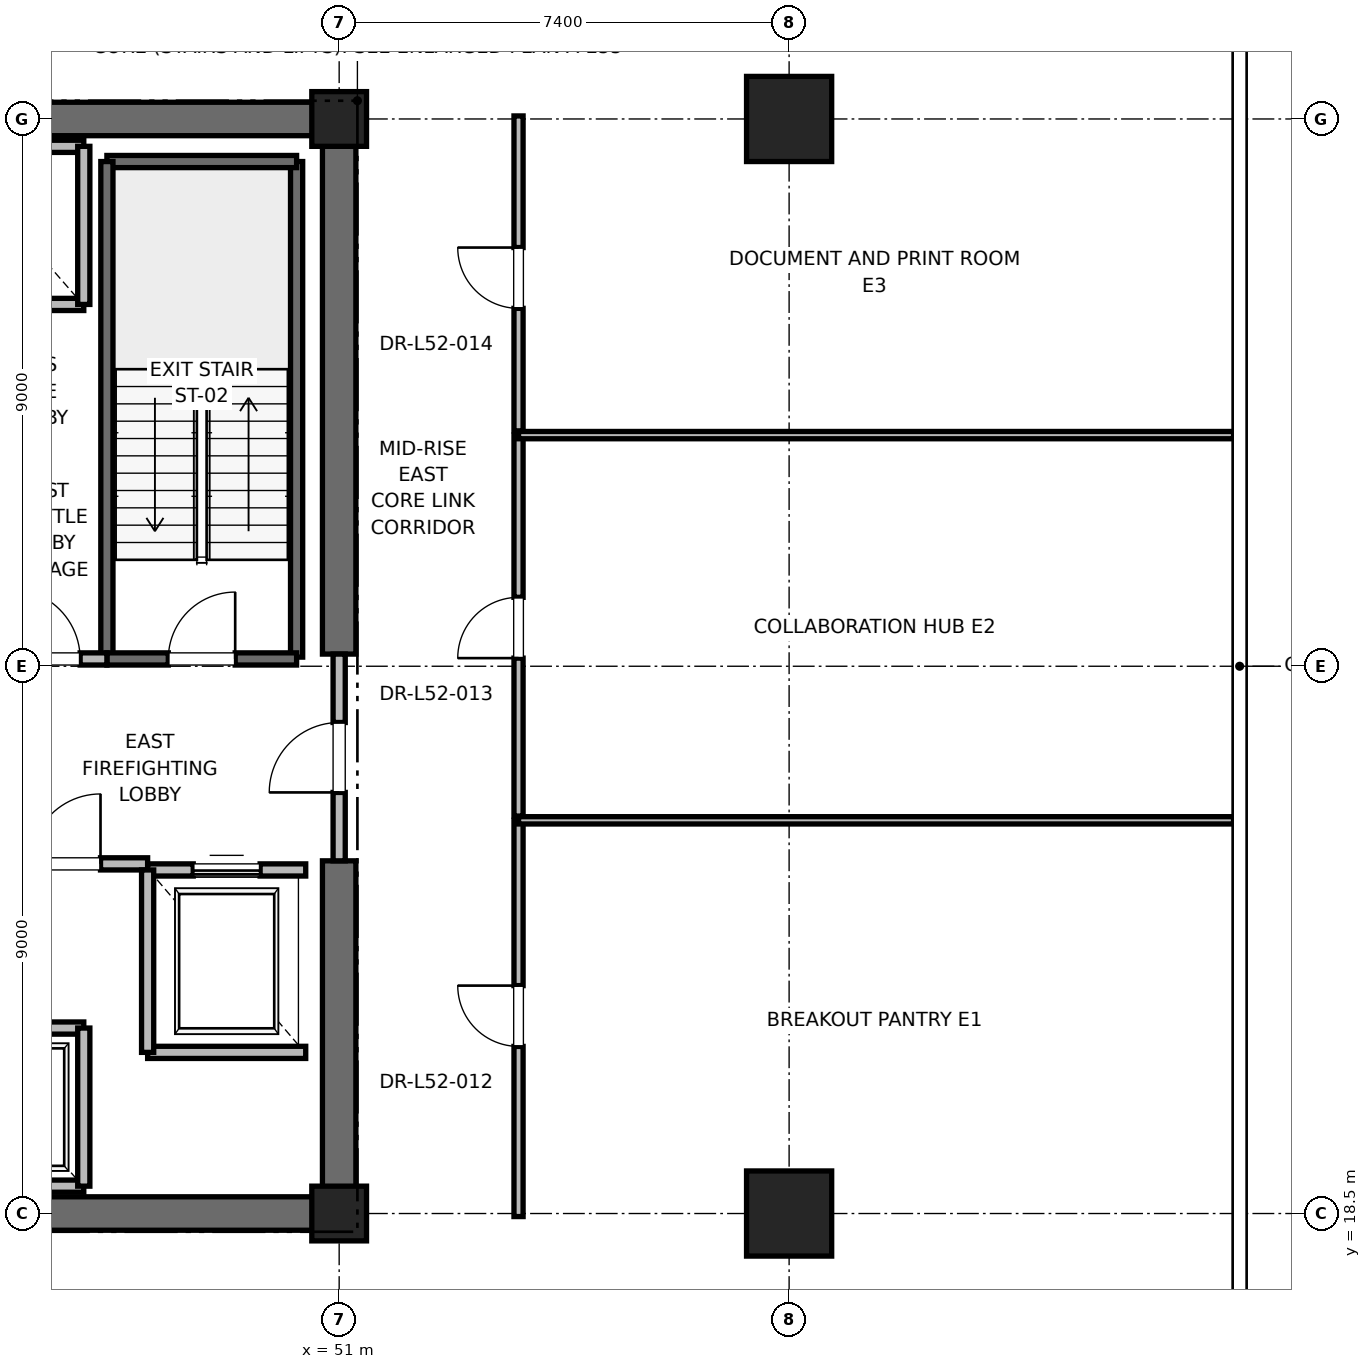
"""IFC4 building model, lengths in metres.
Left out: names, types, materials, properties, quantities, classifications, styles, units other than length and angle.
Written with IfcOpenShell. Run it as: python <this file> out.ifc"""

import sys

from ifc_helpers import new_model, si_unit, direction, frame, frame_2d, origin, origin_2d, place, context, subcontext, project, spatial, rectangle, extrude, element, fill, save


model = new_model("IFC4")
c1 = context("Model", 3, precision=1e-05, world=origin(), true_north=direction((0.0, 1.0)))
c2 = subcontext(c1, "Body", "Model", "MODEL_VIEW")
j1 = project(units=[si_unit("LENGTHUNIT", "METRE"), si_unit("PLANEANGLEUNIT", "RADIAN")], contexts=[c1])
p1 = place(None, origin())
s1 = spatial("IfcSite", under=j1, at=p1, CompositionType="ELEMENT")
p2 = place(p1, origin())
s2 = spatial("IfcBuilding", under=s1, at=p2, CompositionType="ELEMENT")
p3 = place(p2, frame((0.0, 0.0, 225.2)))
s3 = spatial("IfcBuildingStorey", under=s2, at=p3, CompositionType="ELEMENT", Elevation=225.2)
for number, where, z_axis, x_axis in (
    (1, (58.4, 18.5, 0.0), (0.0, 0.0, 1.0), (1.0, 0.0, 0.0)),
    (2, (58.4, 36.5, 0.0), (0.0, 0.0, 1.0), (1.0, 0.0, 0.0)),
):
    element("IfcColumn", number, at=place(p3, frame(where, z_axis=z_axis, x_axis=x_axis)), inside=s3, PredefinedType="COLUMN", context=c2, shape_type="SweptSolid", body=[
        extrude(rectangle(XDim=1.4, YDim=1.4, at=origin_2d()), origin(), (0.0, 0.0, 1.0), 4.0),
    ])
for number, where, z_axis, x_axis in (
    (3, (51.0, 18.5, 0.0), (0.0, 0.0, 1.0), (1.0, 0.0, 0.0)),
    (4, (51.0, 36.5, 0.0), (0.0, 0.0, 1.0), (1.0, 0.0, 0.0)),
):
    element("IfcColumn", number, at=place(p3, frame(where, z_axis=z_axis, x_axis=x_axis)), inside=s3, PredefinedType="PILASTER", context=c2, shape_type="SweptSolid", body=[
        extrude(rectangle(XDim=0.9, YDim=0.9, at=origin_2d()), origin(), (0.0, 0.0, 1.0), 4.0),
    ])
p4 = place(p3, frame((41.8, 18.5, 0.0), z_axis=(0.0, 0.0, 1.0), x_axis=(1.0, 0.0, 0.0)))
e5 = element("IfcWall", 5, at=p4, inside=s3, PredefinedType="SHEAR", context=c2, shape_type="SweptSolid", body=[
    extrude(rectangle(XDim=9.2, YDim=0.55, at=frame_2d((4.6, 0.0))), origin(), (0.0, 0.0, 1.0), 3.775),
])
for number, where, z_axis, x_axis in (
    (6, (45.2, 36.5, 0.0), (0.0, 0.0, 1.0), (1.0, 0.0, 0.0)),
    (7, (51.0, 18.5, 0.0), (0.0, 0.0, 1.0), (0.0, 1.0, 0.0)),
):
    element("IfcWall", number, at=place(p3, frame(where, z_axis=z_axis, x_axis=x_axis)), inside=s3, PredefinedType="SHEAR", context=c2, shape_type="SweptSolid", body=[
        extrude(rectangle(XDim=5.8, YDim=0.55, at=frame_2d((2.9, 0.0))), origin(), (0.0, 0.0, 1.0), 3.775),
    ])
p5 = place(p3, frame((51.0, 27.7, 0.0), z_axis=(0.0, 0.0, 1.0), x_axis=(0.0, 1.0, 0.0)))
e8 = element("IfcWall", 8, at=p5, inside=s3, PredefinedType="SHEAR", context=c2, shape_type="SweptSolid", body=[
    extrude(rectangle(XDim=8.8, YDim=0.55, at=frame_2d((4.4, 0.0))), origin(), (0.0, 0.0, 1.0), 3.775),
])
p6 = place(p3, frame((50.3, 27.65, 0.0), z_axis=(0.0, 0.0, 1.0), x_axis=(0.0, 1.0, 0.0)))
e9 = element("IfcWall", 9, at=p6, inside=s3, PredefinedType="SOLIDWALL", context=c2, shape_type="SweptSolid", body=[
    extrude(rectangle(XDim=8.15, YDim=0.2, at=frame_2d((4.075, 0.0))), origin(), (0.0, 0.0, 1.0), 3.775),
])
p7 = place(p3, frame((47.18, 35.8, 0.0), z_axis=(0.0, 0.0, 1.0), x_axis=(1.0, 0.0, 0.0)))
e10 = element("IfcWall", 10, at=p7, inside=s3, PredefinedType="SOLIDWALL", context=c2, shape_type="SweptSolid", body=[
    extrude(rectangle(XDim=3.12, YDim=0.2, at=frame_2d((1.56, 0.0))), origin(), (0.0, 0.0, 1.0), 3.775),
])
p8 = place(p3, frame((47.18, 27.62, 0.0), z_axis=(0.0, 0.0, 1.0), x_axis=(0.0, 1.0, 0.0)))
e11 = element("IfcWall", 11, at=p8, inside=s3, PredefinedType="SOLIDWALL", context=c2, shape_type="SweptSolid", body=[
    extrude(rectangle(XDim=8.18, YDim=0.2, at=frame_2d((4.09, 0.0))), origin(), (0.0, 0.0, 1.0), 3.775),
])
p9 = place(p3, frame((47.18, 27.62, 0.0), z_axis=(0.0, 0.0, 1.0), x_axis=(1.0, 0.0, 0.0)))
e12 = element("IfcWall", 12, at=p9, inside=s3, PredefinedType="SOLIDWALL", context=c2, shape_type="SweptSolid", body=[
    extrude(rectangle(XDim=3.12, YDim=0.2, at=frame_2d((1.56, 0.0))), origin(), (0.0, 0.0, 1.0), 3.775),
])
p10 = place(p9, frame((1.01, 0.0, 0.0)))
e13 = element("IfcOpeningElement", 13, at=p10, cuts=e12, PredefinedType="OPENING", context=c2, shape_type="SweptSolid", body=[
    extrude(rectangle(XDim=1.1, YDim=2.15, at=frame_2d((0.55, 1.075))), frame((0.0, 0.1, 0.0), z_axis=(0.0, -1.0, 0.0), x_axis=(1.0, 0.0, 0.0)), (0.0, 0.0, 1.0), 0.2),
])
p11 = place(p3, frame((45.15, 24.25, 0.0), z_axis=(0.0, 0.0, 1.0), x_axis=(1.0, 0.0, 0.0)))
e14 = element("IfcWall", 14, at=p11, inside=s3, PredefinedType="PARTITIONING", context=c2, shape_type="SweptSolid", body=[
    extrude(rectangle(XDim=2.7, YDim=0.2, at=frame_2d((1.35, 0.0))), origin(), (0.0, 0.0, 1.0), 3.775),
])
p12 = place(p11, frame((0.775, 0.0, 0.0)))
e15 = element("IfcOpeningElement", 15, at=p12, cuts=e14, PredefinedType="OPENING", context=c2, shape_type="SweptSolid", body=[
    extrude(rectangle(XDim=1.15, YDim=2.2, at=frame_2d((0.575, 1.1))), frame((0.0, 0.1, 0.0), z_axis=(0.0, -1.0, 0.0), x_axis=(1.0, 0.0, 0.0)), (0.0, 0.0, 1.0), 0.2),
])
p13 = place(p3, frame((45.15, 27.62, 0.0), z_axis=(0.0, 0.0, 1.0), x_axis=(1.0, 0.0, 0.0)))
e16 = element("IfcWall", 16, at=p13, inside=s3, PredefinedType="PARTITIONING", context=c2, shape_type="SweptSolid", body=[
    extrude(rectangle(XDim=2.03, YDim=0.2, at=frame_2d((1.015, 0.0))), origin(), (0.0, 0.0, 1.0), 3.775),
])
p14 = place(p13, frame((0.44, 0.0, 0.0)))
e17 = element("IfcOpeningElement", 17, at=p14, cuts=e16, PredefinedType="OPENING", context=c2, shape_type="SweptSolid", body=[
    extrude(rectangle(XDim=1.15, YDim=2.2, at=frame_2d((0.575, 1.1))), frame((0.0, 0.1, 0.0), z_axis=(0.0, -1.0, 0.0), x_axis=(1.0, 0.0, 0.0)), (0.0, 0.0, 1.0), 0.2),
])
p15 = place(p3, frame((51.0, 24.3, 0.0), z_axis=(0.0, 0.0, 1.0), x_axis=(0.0, 1.0, 0.0)))
e18 = element("IfcWall", 18, at=p15, inside=s3, PredefinedType="PARTITIONING", context=c2, shape_type="SweptSolid", body=[
    extrude(rectangle(XDim=3.4, YDim=0.2, at=frame_2d((1.7, 0.0))), origin(), (0.0, 0.0, 1.0), 2.755),
])
p16 = place(p15, frame((1.125, 0.0, 0.0)))
e19 = element("IfcOpeningElement", 19, at=p16, cuts=e18, PredefinedType="OPENING", context=c2, shape_type="SweptSolid", body=[
    extrude(rectangle(XDim=1.15, YDim=2.2, at=frame_2d((0.575, 1.1))), frame((0.0, 0.1, 0.0), z_axis=(0.0, -1.0, 0.0), x_axis=(1.0, 0.0, 0.0)), (0.0, 0.0, 1.0), 0.2),
])
p17 = place(p3, frame((47.85, 21.15, 0.0), z_axis=(0.0, 0.0, 1.0), x_axis=(1.0, 0.0, 0.0)))
e20 = element("IfcWall", 20, at=p17, inside=s3, PredefinedType="SOLIDWALL", context=c2, shape_type="SweptSolid", body=[
    extrude(rectangle(XDim=2.6, YDim=0.2, at=frame_2d((1.3, 0.0))), origin(), (0.0, 0.0, 1.0), 3.775),
])
p18 = place(p3, frame((50.45, 24.15, 0.0), z_axis=(0.0, 0.0, 1.0), x_axis=(-1.0, 0.0, 0.0)))
e21 = element("IfcWall", 21, at=p18, inside=s3, PredefinedType="SOLIDWALL", context=c2, shape_type="SweptSolid", body=[
    extrude(rectangle(XDim=2.6, YDim=0.2, at=frame_2d((1.3, 0.0))), origin(), (0.0, 0.0, 1.0), 2.755),
])
p19 = place(p18, frame((0.75, 0.0, 0.0)))
e22 = element("IfcOpeningElement", 22, at=p19, cuts=e21, PredefinedType="OPENING", context=c2, shape_type="SweptSolid", body=[
    extrude(rectangle(XDim=1.1, YDim=2.2, at=frame_2d((0.55, 1.1))), frame((0.0, 0.1, 0.0), z_axis=(0.0, -1.0, 0.0), x_axis=(1.0, 0.0, 0.0)), (0.0, 0.0, 1.0), 0.2),
])
p20 = place(p3, frame((47.85, 24.15, 0.0), z_axis=(0.0, 0.0, 1.0), x_axis=(0.0, -1.0, 0.0)))
e23 = element("IfcWall", 23, at=p20, inside=s3, PredefinedType="SOLIDWALL", context=c2, shape_type="SweptSolid", body=[
    extrude(rectangle(XDim=3.0, YDim=0.2, at=frame_2d((1.5, 0.0))), origin(), (0.0, 0.0, 1.0), 3.775),
])
p21 = place(p3, frame((44.5, 18.95, 0.0), z_axis=(0.0, 0.0, 1.0), x_axis=(1.0, 0.0, 0.0)))
e24 = element("IfcWall", 24, at=p21, inside=s3, PredefinedType="SOLIDWALL", context=c2, shape_type="SweptSolid", body=[
    extrude(rectangle(XDim=2.3, YDim=0.2, at=frame_2d((1.15, 0.0))), origin(), (0.0, 0.0, 1.0), 3.775),
])
p22 = place(p3, frame((46.8, 21.55, 0.0), z_axis=(0.0, 0.0, 1.0), x_axis=(-1.0, 0.0, 0.0)))
e25 = element("IfcWall", 25, at=p22, inside=s3, PredefinedType="SOLIDWALL", context=c2, shape_type="SweptSolid", body=[
    extrude(rectangle(XDim=2.3, YDim=0.2, at=frame_2d((1.15, 0.0))), origin(), (0.0, 0.0, 1.0), 3.775),
])
p23 = place(p22, frame((0.6, 0.0, 0.0)))
e26 = element("IfcOpeningElement", 26, at=p23, cuts=e25, PredefinedType="OPENING", context=c2, shape_type="SweptSolid", body=[
    extrude(rectangle(XDim=1.1, YDim=2.2, at=frame_2d((0.55, 1.1))), frame((0.0, 0.1, 0.0), z_axis=(0.0, -1.0, 0.0), x_axis=(1.0, 0.0, 0.0)), (0.0, 0.0, 1.0), 0.2),
])
p24 = place(p3, frame((46.8, 18.95, 0.0), z_axis=(0.0, 0.0, 1.0), x_axis=(0.0, 1.0, 0.0)))
e27 = element("IfcWall", 27, at=p24, inside=s3, PredefinedType="SOLIDWALL", context=c2, shape_type="SweptSolid", body=[
    extrude(rectangle(XDim=2.6, YDim=0.2, at=frame_2d((1.3, 0.0))), origin(), (0.0, 0.0, 1.0), 3.775),
])
p25 = place(p3, frame((44.5, 33.45, 0.0), z_axis=(0.0, 0.0, 1.0), x_axis=(1.0, 0.0, 0.0)))
e28 = element("IfcWall", 28, at=p25, inside=s3, PredefinedType="SOLIDWALL", context=c2, shape_type="SweptSolid", body=[
    extrude(rectangle(XDim=2.3, YDim=0.2, at=frame_2d((1.15, 0.0))), origin(), (0.0, 0.0, 1.0), 3.775),
])
p26 = place(p3, frame((46.8, 36.05, 0.0), z_axis=(0.0, 0.0, 1.0), x_axis=(-1.0, 0.0, 0.0)))
e29 = element("IfcWall", 29, at=p26, inside=s3, PredefinedType="SOLIDWALL", context=c2, shape_type="SweptSolid", body=[
    extrude(rectangle(XDim=2.3, YDim=0.2, at=frame_2d((1.15, 0.0))), origin(), (0.0, 0.0, 1.0), 2.755),
])
p27 = place(p3, frame((46.8, 33.45, 0.0), z_axis=(0.0, 0.0, 1.0), x_axis=(0.0, 1.0, 0.0)))
e30 = element("IfcWall", 30, at=p27, inside=s3, PredefinedType="SOLIDWALL", context=c2, shape_type="SweptSolid", body=[
    extrude(rectangle(XDim=2.6, YDim=0.2, at=frame_2d((1.3, 0.0))), origin(), (0.0, 0.0, 1.0), 3.775),
])
p28 = place(p3, frame((53.95, 18.45, 0.0), z_axis=(0.0, 0.0, 1.0), x_axis=(0.0, 1.0, 0.0)))
e31 = element("IfcWall", 31, at=p28, inside=s3, PredefinedType="PARTITIONING", context=c2, shape_type="SweptSolid", body=[
    extrude(rectangle(XDim=6.516, YDim=0.15, at=frame_2d((3.258, 0.0))), origin(), (0.0, 0.0, 1.0), 2.85),
])
p29 = place(p28, frame((2.798, 0.0, 0.0)))
e32 = element("IfcOpeningElement", 32, at=p29, cuts=e31, PredefinedType="OPENING", context=c2, shape_type="SweptSolid", body=[
    extrude(rectangle(XDim=1.0, YDim=2.15, at=frame_2d((0.5, 1.075))), frame((0.0, 0.075, 0.0), z_axis=(0.0, -1.0, 0.0), x_axis=(1.0, 0.0, 0.0)), (0.0, 0.0, 1.0), 0.15),
])
p30 = place(p3, frame((53.95, 24.966, 0.0), z_axis=(0.0, 0.0, 1.0), x_axis=(1.0, 0.0, 0.0)))
e33 = element("IfcWall", 33, at=p30, inside=s3, PredefinedType="PARTITIONING", context=c2, shape_type="SweptSolid", body=[
    extrude(rectangle(XDim=11.76, YDim=0.12, at=frame_2d((5.88, 0.0))), origin(), (0.0, 0.0, 1.0), 2.85),
])
p31 = place(p3, frame((53.95, 25.036, 0.0), z_axis=(0.0, 0.0, 1.0), x_axis=(0.0, 1.0, 0.0)))
e34 = element("IfcWall", 34, at=p31, inside=s3, PredefinedType="PARTITIONING", context=c2, shape_type="SweptSolid", body=[
    extrude(rectangle(XDim=6.265, YDim=0.15, at=frame_2d((3.133, 0.0))), origin(), (0.0, 0.0, 1.0), 2.85),
])
p32 = place(p31, frame((2.597, 0.0, 0.0)))
e35 = element("IfcOpeningElement", 35, at=p32, cuts=e34, PredefinedType="OPENING", context=c2, shape_type="SweptSolid", body=[
    extrude(rectangle(XDim=1.0, YDim=2.15, at=frame_2d((0.5, 1.075))), frame((0.0, 0.075, 0.0), z_axis=(0.0, -1.0, 0.0), x_axis=(1.0, 0.0, 0.0)), (0.0, 0.0, 1.0), 0.15),
])
p33 = place(p3, frame((53.95, 31.301, 0.0), z_axis=(0.0, 0.0, 1.0), x_axis=(1.0, 0.0, 0.0)))
e36 = element("IfcWall", 36, at=p33, inside=s3, PredefinedType="PARTITIONING", context=c2, shape_type="SweptSolid", body=[
    extrude(rectangle(XDim=11.76, YDim=0.12, at=frame_2d((5.88, 0.0))), origin(), (0.0, 0.0, 1.0), 2.85),
])
p34 = place(p3, frame((53.95, 31.371, 0.0), z_axis=(0.0, 0.0, 1.0), x_axis=(0.0, 1.0, 0.0)))
e37 = element("IfcWall", 37, at=p34, inside=s3, PredefinedType="PARTITIONING", context=c2, shape_type="SweptSolid", body=[
    extrude(rectangle(XDim=5.179, YDim=0.15, at=frame_2d((2.589, 0.0))), origin(), (0.0, 0.0, 1.0), 2.85),
])
p35 = place(p34, frame((2.014, 0.0, 0.0)))
e38 = element("IfcOpeningElement", 38, at=p35, cuts=e37, PredefinedType="OPENING", context=c2, shape_type="SweptSolid", body=[
    extrude(rectangle(XDim=1.0, YDim=2.15, at=frame_2d((0.5, 1.075))), frame((0.0, 0.075, 0.0), z_axis=(0.0, -1.0, 0.0), x_axis=(1.0, 0.0, 0.0)), (0.0, 0.0, 1.0), 0.15),
])
p36 = place(p10, origin())
e39 = element("IfcDoor", 39, at=p36, inside=s3, OperationType="SINGLE_SWING_RIGHT", PredefinedType="DOOR", context=c2, shape_type="SweptSolid", body=[
    extrude(rectangle(XDim=1.1, YDim=2.15, at=frame_2d((0.55, 1.075))), frame((0.0, 0.025, 0.0), z_axis=(0.0, -1.0, 0.0), x_axis=(1.0, 0.0, 0.0)), (0.0, 0.0, 1.0), 0.05),
])
fill(e13, e39)
p37 = place(p12, origin())
e40 = element("IfcDoor", 40, at=p37, inside=s3, OperationType="SINGLE_SWING_RIGHT", PredefinedType="DOOR", context=c2, shape_type="SweptSolid", body=[
    extrude(rectangle(XDim=1.15, YDim=2.2, at=frame_2d((0.575, 1.1))), frame((0.0, 0.025, 0.0), z_axis=(0.0, -1.0, 0.0), x_axis=(1.0, 0.0, 0.0)), (0.0, 0.0, 1.0), 0.05),
])
fill(e15, e40)
p38 = place(p14, origin())
e41 = element("IfcDoor", 41, at=p38, inside=s3, OperationType="SINGLE_SWING_LEFT", PredefinedType="DOOR", context=c2, shape_type="SweptSolid", body=[
    extrude(rectangle(XDim=1.15, YDim=2.2, at=frame_2d((0.575, 1.1))), frame((0.0, 0.025, 0.0), z_axis=(0.0, -1.0, 0.0), x_axis=(1.0, 0.0, 0.0)), (0.0, 0.0, 1.0), 0.05),
])
fill(e17, e41)
p39 = place(p16, origin())
e42 = element("IfcDoor", 42, at=p39, inside=s3, OperationType="SINGLE_SWING_LEFT", PredefinedType="DOOR", context=c2, shape_type="SweptSolid", body=[
    extrude(rectangle(XDim=1.15, YDim=2.2, at=frame_2d((0.575, 1.1))), frame((0.0, 0.025, 0.0), z_axis=(0.0, -1.0, 0.0), x_axis=(1.0, 0.0, 0.0)), (0.0, 0.0, 1.0), 0.05),
])
fill(e19, e42)
p40 = place(p19, origin())
e43 = element("IfcDoor", 43, at=p40, inside=s3, OperationType="SLIDING_TO_RIGHT", PredefinedType="DOOR", context=c2, shape_type="SweptSolid", body=[
    extrude(rectangle(XDim=1.1, YDim=2.2, at=frame_2d((0.55, 1.1))), frame((0.0, 0.025, 0.0), z_axis=(0.0, -1.0, 0.0), x_axis=(1.0, 0.0, 0.0)), (0.0, 0.0, 1.0), 0.05),
])
fill(e22, e43)
p41 = place(p29, origin())
e44 = element("IfcDoor", 44, at=p41, inside=s3, OperationType="SINGLE_SWING_RIGHT", PredefinedType="DOOR", context=c2, shape_type="SweptSolid", body=[
    extrude(rectangle(XDim=1.0, YDim=2.15, at=frame_2d((0.5, 1.075))), frame((0.0, 0.025, 0.0), z_axis=(0.0, -1.0, 0.0), x_axis=(1.0, 0.0, 0.0)), (0.0, 0.0, 1.0), 0.05),
])
fill(e32, e44)
p42 = place(p32, origin())
e45 = element("IfcDoor", 45, at=p42, inside=s3, OperationType="SINGLE_SWING_LEFT", PredefinedType="DOOR", context=c2, shape_type="SweptSolid", body=[
    extrude(rectangle(XDim=1.0, YDim=2.15, at=frame_2d((0.5, 1.075))), frame((0.0, 0.025, 0.0), z_axis=(0.0, -1.0, 0.0), x_axis=(1.0, 0.0, 0.0)), (0.0, 0.0, 1.0), 0.05),
])
fill(e35, e45)
p43 = place(p35, origin())
e46 = element("IfcDoor", 46, at=p43, inside=s3, OperationType="SINGLE_SWING_RIGHT", PredefinedType="DOOR", context=c2, shape_type="SweptSolid", body=[
    extrude(rectangle(XDim=1.0, YDim=2.15, at=frame_2d((0.5, 1.075))), frame((0.0, 0.025, 0.0), z_axis=(0.0, -1.0, 0.0), x_axis=(1.0, 0.0, 0.0)), (0.0, 0.0, 1.0), 0.05),
])
fill(e38, e46)
save(model, sys.argv[1])
